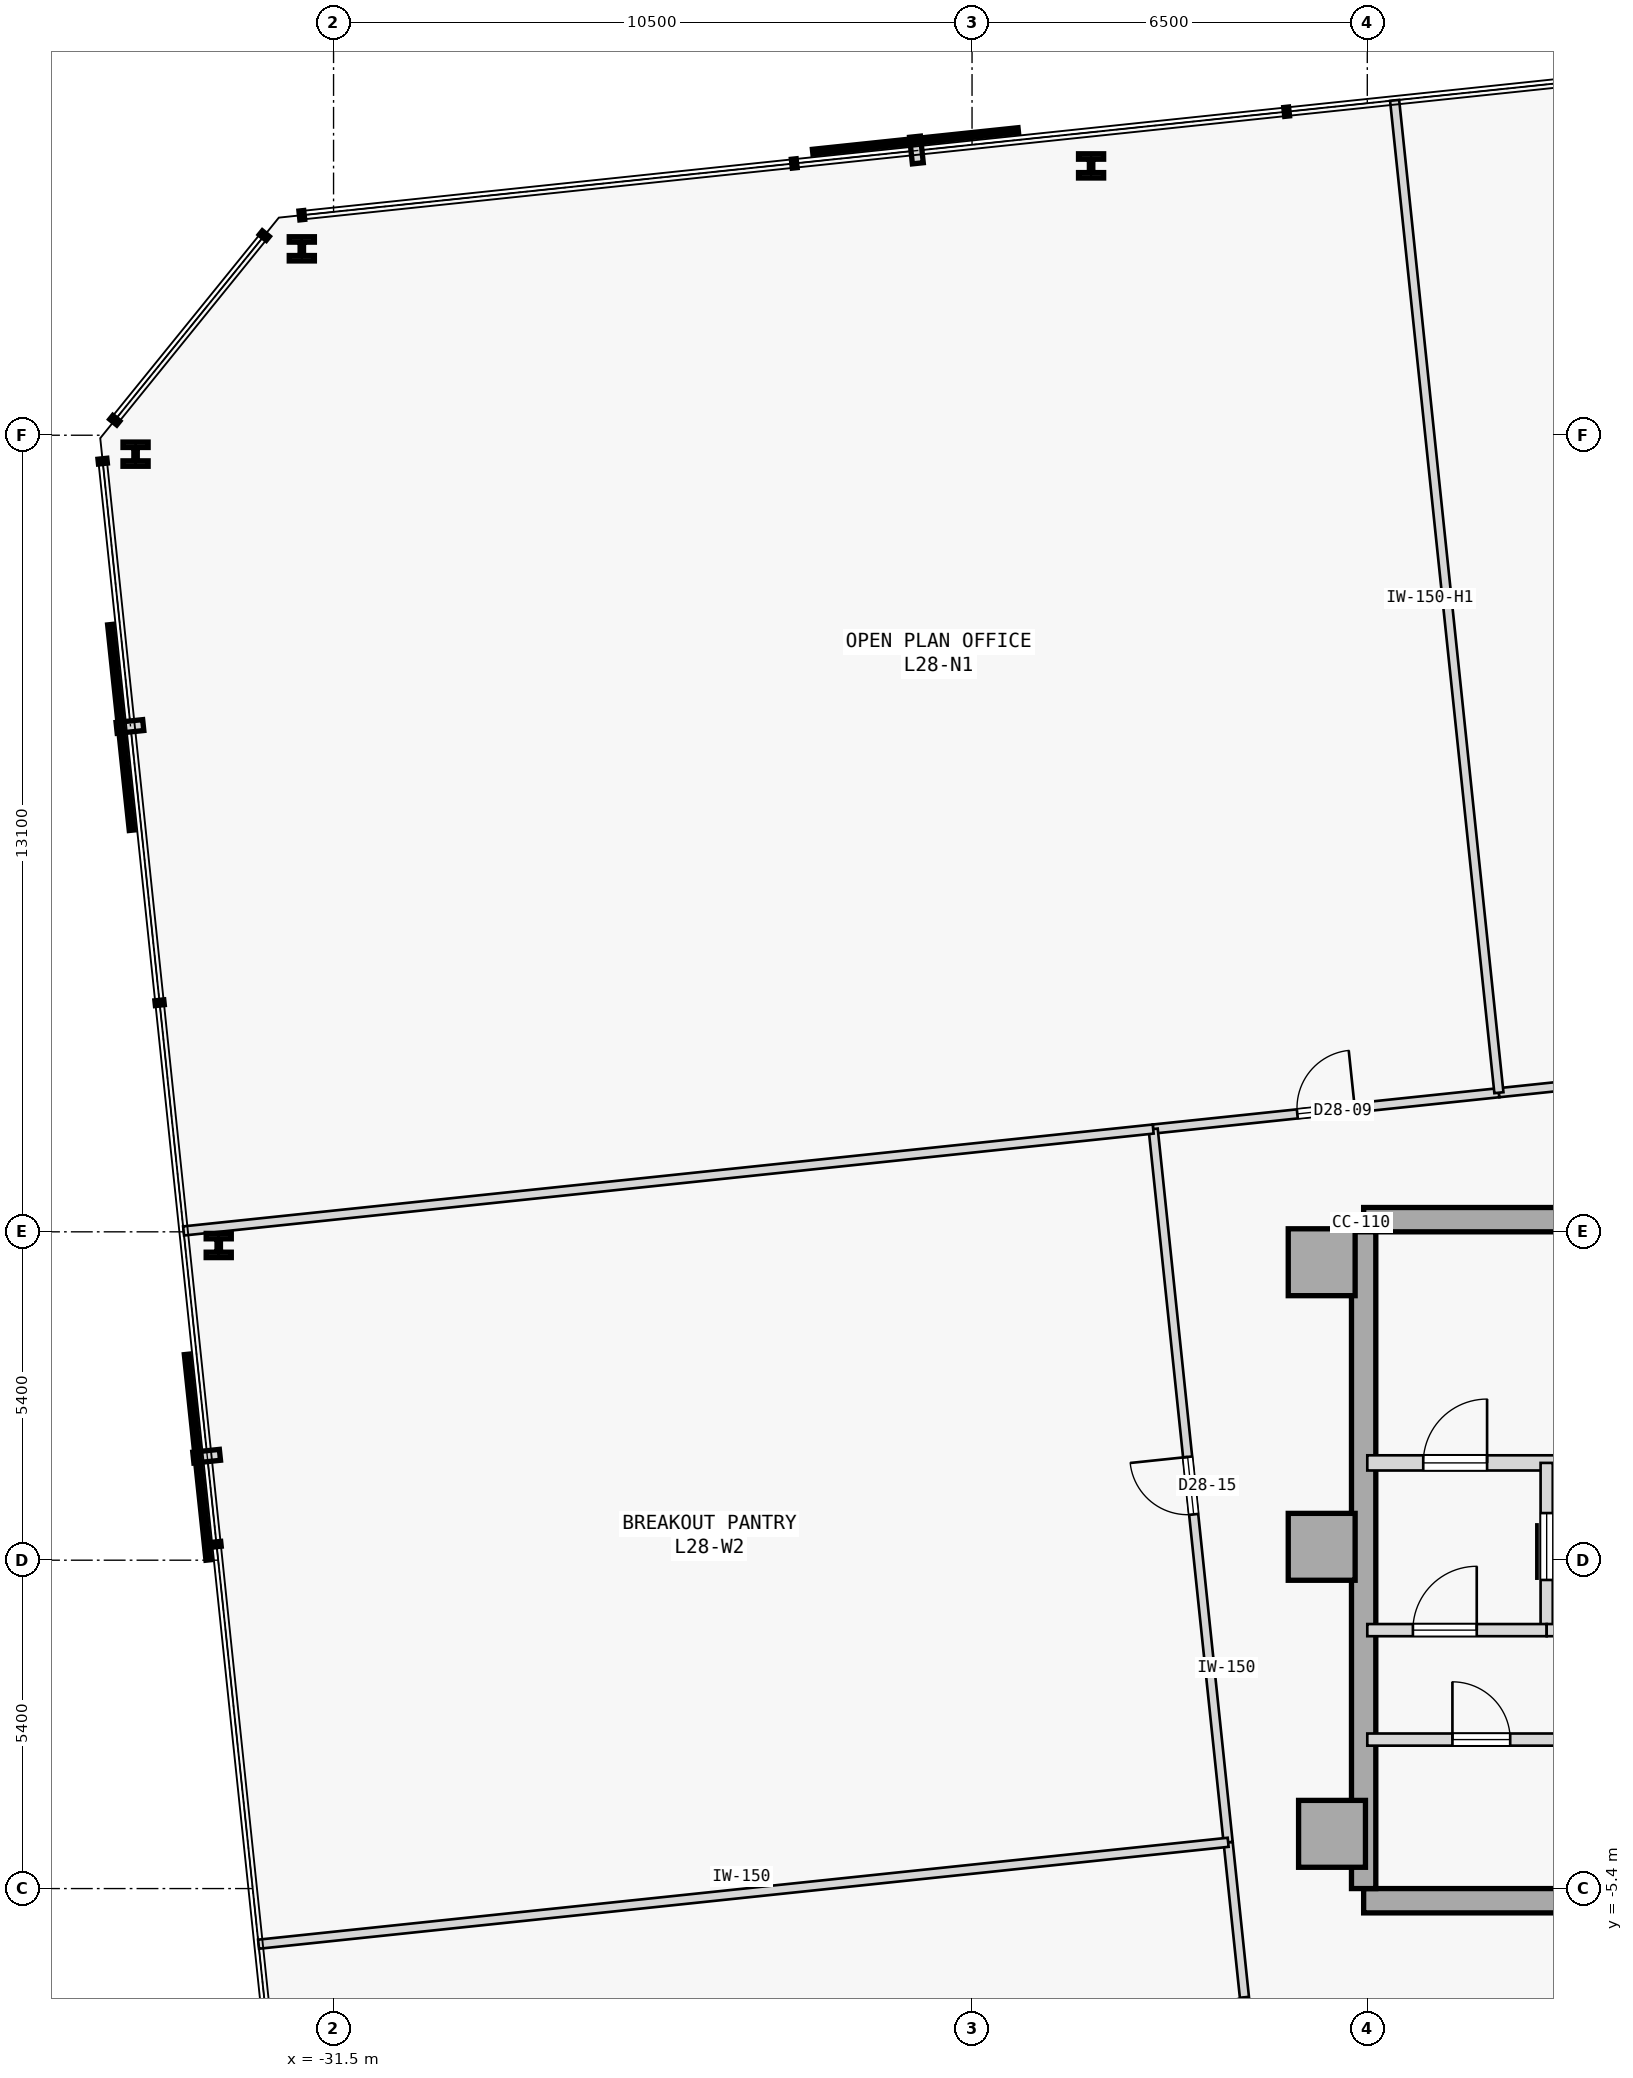
"""IFC4 building model, lengths in metres.
Left out: names, types, materials, properties, quantities, classifications, styles, units other than length and angle.
Written with IfcOpenShell. Run it as: python <this file> out.ifc"""

import sys

from ifc_helpers import new_model, si_unit, direction, frame, frame_2d, origin, origin_2d, place, context, subcontext, project, spatial, rectangle, i_section, extrude, element, fill, save


model = new_model("IFC4")
c1 = context("Model", 3, precision=1e-05, world=origin(), true_north=direction((0.0, 1.0)))
c2 = subcontext(c1, "Body", "Model", "MODEL_VIEW")
j1 = project(units=[si_unit("LENGTHUNIT", "METRE"), si_unit("PLANEANGLEUNIT", "RADIAN")], contexts=[c1])
p1 = place(None, origin())
s1 = spatial("IfcSite", under=j1, at=p1, CompositionType="ELEMENT")
p2 = place(p1, origin())
s2 = spatial("IfcBuilding", under=s1, at=p2, CompositionType="ELEMENT")
p3 = place(p2, frame((0.0, 0.0, 113.3)))
s3 = spatial("IfcBuildingStorey", under=s2, at=p3, CompositionType="ELEMENT", Elevation=113.3)
for number, where, z_axis, x_axis in (
    (1, (-15.25, 4.9, 0.0), (0.0, 0.0, 1.0), (1.0, 0.0, 0.0)),
    (2, (-15.25, 0.22, 0.0), (0.0, 0.0, 1.0), (1.0, 0.0, 0.0)),
    (3, (-15.08, -4.5, 0.0), (0.0, 0.0, 1.0), (1.0, 0.0, 0.0)),
):
    element("IfcColumn", number, at=place(p3, frame(where, z_axis=z_axis, x_axis=x_axis)), inside=s3, PredefinedType="COLUMN", context=c2, shape_type="SweptSolid", body=[
        extrude(rectangle(XDim=1.1, YDim=1.1, at=origin_2d()), origin(), (0.0, 0.0, 1.0), 3.7),
    ])
p4 = place(p3, frame((-14.56, 5.6, 0.0), z_axis=(0.0, 0.0, 1.0), x_axis=(1.0, 0.0, 0.0)))
e4 = element("IfcWall", 4, at=p4, inside=s3, PredefinedType="SHEAR", context=c2, shape_type="SweptSolid", body=[
    extrude(rectangle(XDim=11.41, YDim=0.4, at=frame_2d((5.705, 0.0))), origin(), (0.0, 0.0, 1.0), 3.475),
])
p5 = place(p3, frame((-14.56, -5.6, 0.0), z_axis=(0.0, 0.0, 1.0), x_axis=(1.0, 0.0, 0.0)))
e5 = element("IfcWall", 5, at=p5, inside=s3, PredefinedType="SHEAR", context=c2, shape_type="SweptSolid", body=[
    extrude(rectangle(XDim=10.86, YDim=0.4, at=frame_2d((5.43, 0.0))), origin(), (0.0, 0.0, 1.0), 3.475),
])
p6 = place(p3, frame((-14.56, -5.4, 0.0), z_axis=(0.0, 0.0, 1.0), x_axis=(0.0, 1.0, 0.0)))
e6 = element("IfcWall", 6, at=p6, inside=s3, PredefinedType="SHEAR", context=c2, shape_type="SweptSolid", body=[
    extrude(rectangle(XDim=10.8, YDim=0.4, at=frame_2d((5.4, 0.0))), origin(), (0.0, 0.0, 1.0), 3.475),
])
for number, where, z_axis, x_axis in (
    (7, (-19.042, 22.929, 0.0), (0.0, 0.0, 1.0), (1.0, 0.0, 0.0)),
    (8, (-32.022, 21.565, 0.0), (0.0, 0.0, 1.0), (1.0, 0.0, 0.0)),
    (9, (-34.756, 18.189, 0.0), (0.0, 0.0, 1.0), (1.0, 0.0, 0.0)),
    (10, (-33.388, 5.175, 0.0), (0.0, 0.0, 1.0), (1.0, 0.0, 0.0)),
):
    element("IfcColumn", number, at=place(p3, frame(where, z_axis=z_axis, x_axis=x_axis)), inside=s3, PredefinedType="COLUMN", context=c2, shape_type="SweptSolid", body=[
        extrude(i_section(OverallWidth=0.413, OverallDepth=0.398, WebThickness=0.056, FlangeThickness=0.089, FilletRadius=0.015, at=origin_2d()), origin(), (0.0, 0.0, 1.0), 3.7),
    ])
p7 = place(p3, frame((-14.5, 1.6, 0.0), z_axis=(0.0, 0.0, 1.0), x_axis=(1.0, 0.0, 0.0)))
e11 = element("IfcWall", 11, at=p7, inside=s3, PredefinedType="STANDARD", context=c2, shape_type="SweptSolid", body=[
    extrude(rectangle(XDim=3.6, YDim=0.25, at=frame_2d((1.8, 0.0))), origin(), (0.0, 0.0, 1.0), 3.475),
])
p8 = place(p7, frame((0.92, 0.0, 0.0)))
e12 = element("IfcOpeningElement", 12, at=p8, cuts=e11, PredefinedType="OPENING", context=c2, shape_type="SweptSolid", body=[
    extrude(rectangle(XDim=1.05, YDim=2.15, at=frame_2d((0.525, 1.075))), frame((0.0, 0.135, 0.0), z_axis=(0.0, -1.0, 0.0), x_axis=(1.0, 0.0, 0.0)), (0.0, 0.0, 1.0), 0.27),
])
p9 = place(p3, frame((-11.55, -1.15, 0.0), z_axis=(0.0, 0.0, 1.0), x_axis=(0.0, 1.0, 0.0)))
e13 = element("IfcWall", 13, at=p9, inside=s3, PredefinedType="STANDARD", context=c2, shape_type="SweptSolid", body=[
    extrude(rectangle(XDim=2.75, YDim=0.2, at=frame_2d((1.375, 0.0))), origin(), (0.0, 0.0, 1.0), 3.475),
])
p10 = place(p9, frame((0.825, 0.0, 0.0)))
e14 = element("IfcOpeningElement", 14, at=p10, cuts=e13, PredefinedType="OPENING", context=c2, shape_type="SweptSolid", body=[
    extrude(rectangle(XDim=1.1, YDim=2.15, at=frame_2d((0.55, 1.075))), frame((0.0, 0.11, 0.0), z_axis=(0.0, -1.0, 0.0), x_axis=(1.0, 0.0, 0.0)), (0.0, 0.0, 1.0), 0.22),
])
p11 = place(p3, frame((-14.5, -1.15, 0.0), z_axis=(0.0, 0.0, 1.0), x_axis=(1.0, 0.0, 0.0)))
e15 = element("IfcWall", 15, at=p11, inside=s3, PredefinedType="STANDARD", context=c2, shape_type="SweptSolid", body=[
    extrude(rectangle(XDim=2.95, YDim=0.2, at=frame_2d((1.475, 0.0))), origin(), (0.0, 0.0, 1.0), 3.475),
])
p12 = place(p11, frame((0.75, 0.0, 0.0)))
e16 = element("IfcOpeningElement", 16, at=p12, cuts=e15, PredefinedType="OPENING", context=c2, shape_type="SweptSolid", body=[
    extrude(rectangle(XDim=1.05, YDim=2.18, at=frame_2d((0.525, 1.09))), frame((0.0, 0.11, 0.0), z_axis=(0.0, -1.0, 0.0), x_axis=(1.0, 0.0, 0.0)), (0.0, 0.0, 1.0), 0.22),
])
p13 = place(p3, frame((-11.55, -1.15, 0.0), z_axis=(0.0, 0.0, 1.0), x_axis=(1.0, 0.0, 0.0)))
e17 = element("IfcWall", 17, at=p13, inside=s3, PredefinedType="STANDARD", context=c2, shape_type="SweptSolid", body=[
    extrude(rectangle(XDim=2.2, YDim=0.2, at=frame_2d((1.1, 0.0))), origin(), (0.0, 0.0, 1.0), 3.475),
])
p14 = place(p3, frame((-14.5, -2.95, 0.0), z_axis=(0.0, 0.0, 1.0), x_axis=(1.0, 0.0, 0.0)))
e18 = element("IfcWall", 18, at=p14, inside=s3, PredefinedType="STANDARD", context=c2, shape_type="SweptSolid", body=[
    extrude(rectangle(XDim=10.8, YDim=0.2, at=frame_2d((5.4, 0.0))), origin(), (0.0, 0.0, 1.0), 3.475),
])
p15 = place(p14, frame((4.85, 0.0, 0.0)))
e19 = element("IfcOpeningElement", 19, at=p15, cuts=e18, PredefinedType="OPENING", context=c2, shape_type="SweptSolid", body=[
    extrude(rectangle(XDim=1.1, YDim=2.15, at=frame_2d((0.55, 1.075))), frame((0.0, 0.11, 0.0), z_axis=(0.0, -1.0, 0.0), x_axis=(1.0, 0.0, 0.0)), (0.0, 0.0, 1.0), 0.22),
])
p16 = place(p14, frame((7.01, 0.0, 0.0)))
e20 = element("IfcOpeningElement", 20, at=p16, cuts=e18, PredefinedType="OPENING", context=c2, shape_type="SweptSolid", body=[
    extrude(rectangle(XDim=1.1, YDim=2.15, at=frame_2d((0.55, 1.075))), frame((0.0, 0.11, 0.0), z_axis=(0.0, -1.0, 0.0), x_axis=(1.0, 0.0, 0.0)), (0.0, 0.0, 1.0), 0.22),
])
p17 = place(p14, frame((1.4, 0.0, 0.0)))
e21 = element("IfcOpeningElement", 21, at=p17, cuts=e18, PredefinedType="OPENING", context=c2, shape_type="SweptSolid", body=[
    extrude(rectangle(XDim=0.95, YDim=2.15, at=frame_2d((0.475, 1.075))), frame((0.0, 0.11, 0.0), z_axis=(0.0, -1.0, 0.0), x_axis=(1.0, 0.0, 0.0)), (0.0, 0.0, 1.0), 0.22),
])
p18 = place(p3, frame((-18.021, 7.09, 0.0), z_axis=(0.0, 0.0, 1.0), x_axis=(0.994520418841, 0.104542510534, 0.0)))
e22 = element("IfcWall", 22, at=p18, inside=s3, PredefinedType="PARTITIONING", context=c2, shape_type="SweptSolid", body=[
    extrude(rectangle(XDim=5.717, YDim=0.15, at=frame_2d((2.858, 0.0))), origin(), (0.0, 0.0, 1.0), 3.475),
])
p19 = place(p18, frame((2.384, 0.0, 0.0)))
e23 = element("IfcOpeningElement", 23, at=p19, cuts=e22, PredefinedType="OPENING", context=c2, shape_type="SweptSolid", body=[
    extrude(rectangle(XDim=0.95, YDim=2.15, at=frame_2d((0.475, 1.075))), frame((0.0, 0.085, 0.0), z_axis=(0.0, -1.0, 0.0), x_axis=(1.0, 0.0, 0.0)), (0.0, 0.0, 1.0), 0.17),
])
p20 = place(p3, frame((-12.336, 7.688, 0.0), z_axis=(0.0, 0.0, 1.0), x_axis=(0.994522386381, 0.104523791488, 0.0)))
e24 = element("IfcWall", 24, at=p20, inside=s3, PredefinedType="PARTITIONING", context=c2, shape_type="SweptSolid", body=[
    extrude(rectangle(XDim=27.55, YDim=0.15, at=frame_2d((13.775, 0.0))), origin(), (0.0, 0.0, 1.0), 3.475),
])
p21 = place(p20, frame((13.3, 0.0, 0.0)))
e25 = element("IfcOpeningElement", 25, at=p21, cuts=e24, PredefinedType="OPENING", context=c2, shape_type="SweptSolid", body=[
    extrude(rectangle(XDim=0.95, YDim=2.15, at=frame_2d((0.475, 1.075))), frame((0.0, 0.085, 0.0), z_axis=(0.0, -1.0, 0.0), x_axis=(1.0, 0.0, 0.0)), (0.0, 0.0, 1.0), 0.17),
])
p22 = place(p3, frame((-13.338, -10.515, 0.0), z_axis=(0.0, 0.0, 1.0), x_axis=(0.994522458216, 0.104523107989, 0.0)))
e26 = element("IfcWall", 26, at=p22, inside=s3, PredefinedType="PARTITIONING", context=c2, shape_type="SweptSolid", body=[
    extrude(rectangle(XDim=31.757, YDim=0.15, at=frame_2d((15.878, 0.0))), origin(), (0.0, 0.0, 1.0), 3.475),
])
p23 = place(p22, frame((15.404, 0.0, 0.0)))
e27 = element("IfcOpeningElement", 27, at=p23, cuts=e26, PredefinedType="OPENING", context=c2, shape_type="SweptSolid", body=[
    extrude(rectangle(XDim=0.95, YDim=2.15, at=frame_2d((0.475, 1.075))), frame((0.0, 0.085, 0.0), z_axis=(0.0, -1.0, 0.0), x_axis=(1.0, 0.0, 0.0)), (0.0, 0.0, 1.0), 0.17),
])
p24 = place(p3, frame((-16.153, -10.682, 0.0), z_axis=(0.0, 0.0, 1.0), x_axis=(-0.104550920346, 0.994519534778, 0.0)))
e28 = element("IfcWall", 28, at=p24, inside=s3, PredefinedType="PARTITIONING", context=c2, shape_type="SweptSolid", body=[
    extrude(rectangle(XDim=6.076, YDim=0.15, at=frame_2d((3.038, 0.0))), origin(), (0.0, 0.0, 1.0), 3.475),
])
p25 = place(p24, frame((2.563, 0.0, 0.0)))
e29 = element("IfcOpeningElement", 29, at=p25, cuts=e28, PredefinedType="OPENING", context=c2, shape_type="SweptSolid", body=[
    extrude(rectangle(XDim=0.95, YDim=2.15, at=frame_2d((0.475, 1.075))), frame((0.0, 0.085, 0.0), z_axis=(0.0, -1.0, 0.0), x_axis=(1.0, 0.0, 0.0)), (0.0, 0.0, 1.0), 0.17),
])
p26 = place(p3, frame((-16.789, -4.639, 0.0), z_axis=(0.0, 0.0, 1.0), x_axis=(-0.104515608009, 0.994523246426, 0.0)))
e30 = element("IfcWall", 30, at=p26, inside=s3, PredefinedType="PARTITIONING", context=c2, shape_type="SweptSolid", body=[
    extrude(rectangle(XDim=11.794, YDim=0.15, at=frame_2d((5.897, 0.0))), origin(), (0.0, 0.0, 1.0), 3.475),
])
p27 = place(p26, frame((5.422, 0.0, 0.0)))
e31 = element("IfcOpeningElement", 31, at=p27, cuts=e30, PredefinedType="OPENING", context=c2, shape_type="SweptSolid", body=[
    extrude(rectangle(XDim=0.95, YDim=2.15, at=frame_2d((0.475, 1.075))), frame((0.0, 0.085, 0.0), z_axis=(0.0, -1.0, 0.0), x_axis=(1.0, 0.0, 0.0)), (0.0, 0.0, 1.0), 0.17),
])
p28 = place(p3, frame((-12.336, 7.688, 0.0), z_axis=(0.0, 0.0, 1.0), x_axis=(-0.104521364336, 0.99452264147, 0.0)))
e32 = element("IfcWall", 32, at=p28, inside=s3, PredefinedType="PARTITIONING", context=c2, shape_type="SweptSolid", body=[
    extrude(rectangle(XDim=16.409, YDim=0.15, at=frame_2d((8.205, 0.0))), origin(), (0.0, 0.0, 1.0), 3.025),
])
p29 = place(p3, frame((-33.967, 5.414, 0.0), z_axis=(0.0, 0.0, 1.0), x_axis=(0.994521211213, 0.104534972363, 0.0)))
e33 = element("IfcWall", 33, at=p29, inside=s3, PredefinedType="PARTITIONING", context=c2, shape_type="SweptSolid", body=[
    extrude(rectangle(XDim=16.033, YDim=0.15, at=frame_2d((8.017, 0.0))), origin(), (0.0, 0.0, 1.0), 3.475),
])
p30 = place(p3, frame((-32.734, -6.315, 0.0), z_axis=(0.0, 0.0, 1.0), x_axis=(0.994522627807, 0.104521494347, 0.0)))
e34 = element("IfcWall", 34, at=p30, inside=s3, PredefinedType="PARTITIONING", context=c2, shape_type="SweptSolid", body=[
    extrude(rectangle(XDim=16.033, YDim=0.15, at=frame_2d((8.017, 0.0))), origin(), (0.0, 0.0, 1.0), 3.475),
])
p31 = place(p8, origin())
e35 = element("IfcDoor", 35, at=p31, inside=s3, OperationType="SINGLE_SWING_RIGHT", PredefinedType="DOOR", context=c2, shape_type="SweptSolid", body=[
    extrude(rectangle(XDim=1.05, YDim=2.15, at=frame_2d((0.525, 1.075))), frame((0.0, 0.025, 0.0), z_axis=(0.0, -1.0, 0.0), x_axis=(1.0, 0.0, 0.0)), (0.0, 0.0, 1.0), 0.05),
])
fill(e12, e35)
p32 = place(p12, origin())
e36 = element("IfcDoor", 36, at=p32, inside=s3, OperationType="SINGLE_SWING_RIGHT", PredefinedType="DOOR", context=c2, shape_type="SweptSolid", body=[
    extrude(rectangle(XDim=1.05, YDim=2.18, at=frame_2d((0.525, 1.09))), frame((0.0, 0.025, 0.0), z_axis=(0.0, -1.0, 0.0), x_axis=(1.0, 0.0, 0.0)), (0.0, 0.0, 1.0), 0.05),
])
fill(e16, e36)
p33 = place(p10, origin())
e37 = element("IfcDoor", 37, at=p33, inside=s3, OperationType="SLIDING_TO_RIGHT", PredefinedType="DOOR", context=c2, shape_type="SweptSolid", body=[
    extrude(rectangle(XDim=1.1, YDim=2.15, at=frame_2d((0.55, 1.075))), frame((0.0, 0.025, 0.0), z_axis=(0.0, -1.0, 0.0), x_axis=(1.0, 0.0, 0.0)), (0.0, 0.0, 1.0), 0.05),
])
fill(e14, e37)
p34 = place(p17, origin())
e38 = element("IfcDoor", 38, at=p34, inside=s3, OperationType="SINGLE_SWING_LEFT", PredefinedType="DOOR", context=c2, shape_type="SweptSolid", body=[
    extrude(rectangle(XDim=0.95, YDim=2.15, at=frame_2d((0.475, 1.075))), frame((0.0, 0.025, 0.0), z_axis=(0.0, -1.0, 0.0), x_axis=(1.0, 0.0, 0.0)), (0.0, 0.0, 1.0), 0.05),
])
fill(e21, e38)
p35 = place(p19, origin())
e39 = element("IfcDoor", 39, at=p35, inside=s3, OperationType="SINGLE_SWING_RIGHT", PredefinedType="DOOR", context=c2, shape_type="SweptSolid", body=[
    extrude(rectangle(XDim=0.95, YDim=2.15, at=frame_2d((0.475, 1.075))), frame((0.0, 0.025, 0.0), z_axis=(0.0, -1.0, 0.0), x_axis=(1.0, 0.0, 0.0)), (0.0, 0.0, 1.0), 0.05),
])
fill(e23, e39)
p36 = place(p25, origin())
e40 = element("IfcDoor", 40, at=p36, inside=s3, OperationType="SINGLE_SWING_LEFT", PredefinedType="DOOR", context=c2, shape_type="SweptSolid", body=[
    extrude(rectangle(XDim=0.95, YDim=2.15, at=frame_2d((0.475, 1.075))), frame((0.0, 0.025, 0.0), z_axis=(0.0, -1.0, 0.0), x_axis=(1.0, 0.0, 0.0)), (0.0, 0.0, 1.0), 0.05),
])
fill(e29, e40)
p37 = place(p27, origin())
e41 = element("IfcDoor", 41, at=p37, inside=s3, OperationType="SINGLE_SWING_RIGHT", PredefinedType="DOOR", context=c2, shape_type="SweptSolid", body=[
    extrude(rectangle(XDim=0.95, YDim=2.15, at=frame_2d((0.475, 1.075))), frame((0.0, 0.025, 0.0), z_axis=(0.0, -1.0, 0.0), x_axis=(1.0, 0.0, 0.0)), (0.0, 0.0, 1.0), 0.05),
])
fill(e31, e41)
save(model, sys.argv[1])
